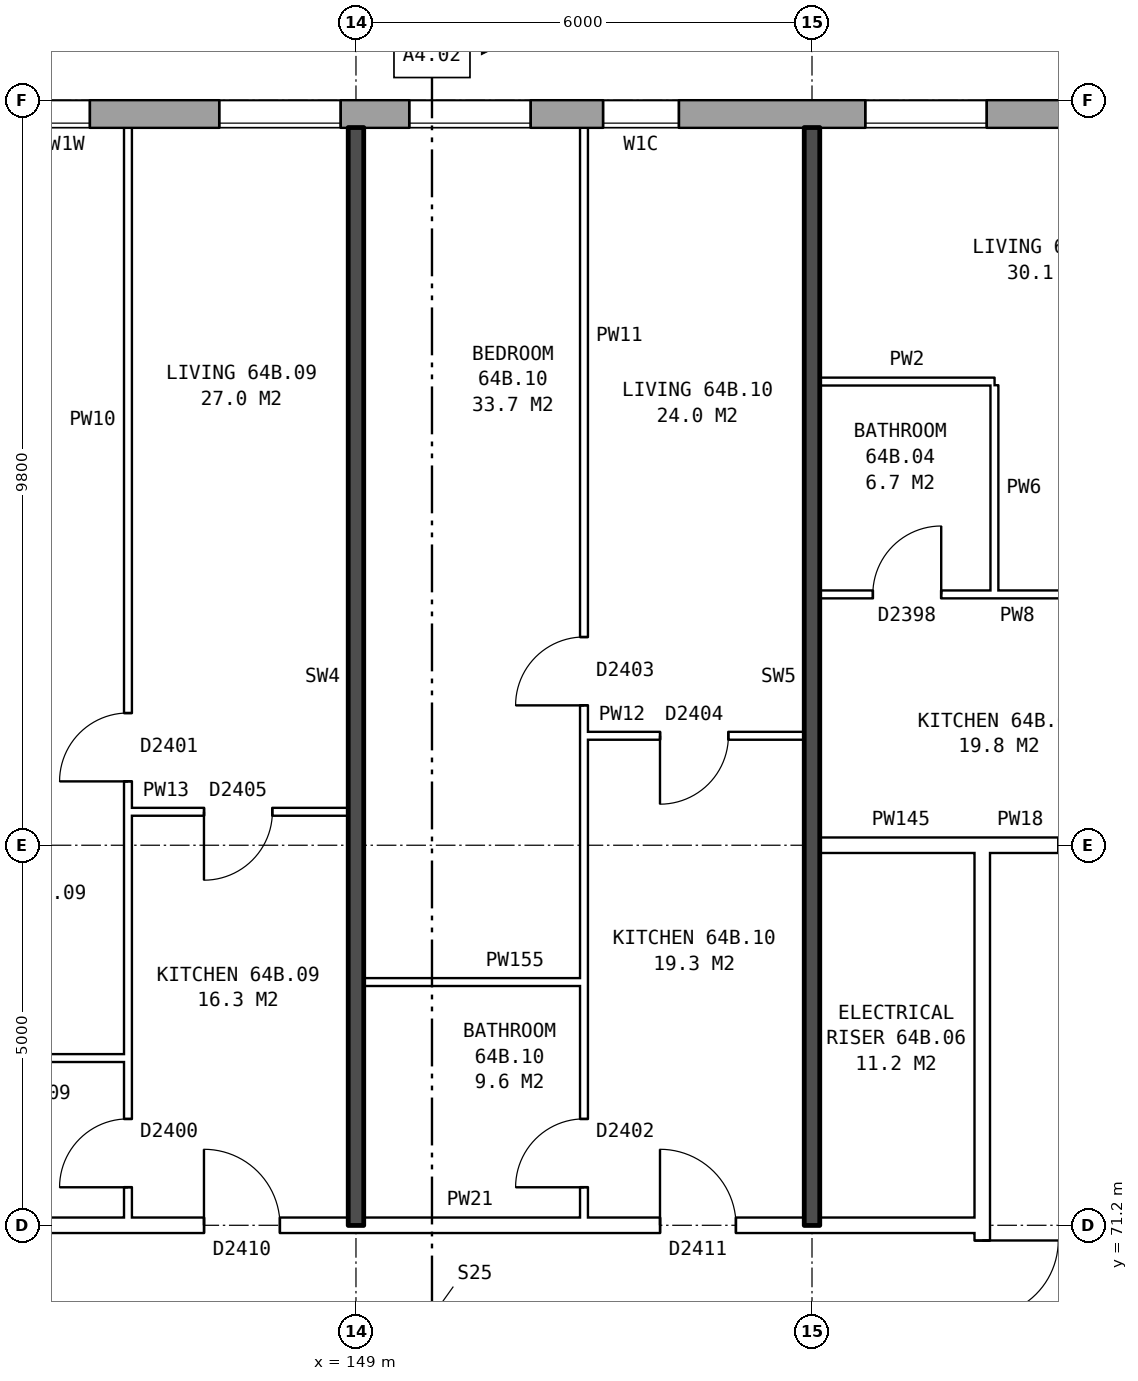
"""IFC4 building model, lengths in metres.
Left out: names, types, materials, properties, quantities, classifications, styles, units other than length and angle.
Written with IfcOpenShell. Run it as: python <this file> out.ifc"""

import sys

from ifc_helpers import new_model, si_unit, direction, frame, frame_2d, origin, place, context, subcontext, project, spatial, rectangle, extrude, element, fill, save


model = new_model("IFC4")
c1 = context("Model", 3, precision=1e-05, world=origin(), true_north=direction((0.0, 1.0)))
c2 = subcontext(c1, "Body", "Model", "MODEL_VIEW")
j1 = project(units=[si_unit("LENGTHUNIT", "METRE"), si_unit("PLANEANGLEUNIT", "RADIAN")], contexts=[c1])
p1 = place(None, origin())
s1 = spatial("IfcSite", under=j1, at=p1, CompositionType="ELEMENT")
p2 = place(p1, origin())
s2 = spatial("IfcBuilding", under=s1, at=p2, CompositionType="ELEMENT")
p3 = place(p2, frame((0.0, 0.0, 227.6)))
s3 = spatial("IfcBuildingStorey", under=s2, at=p3, CompositionType="ELEMENT", Elevation=227.6)
p4 = place(p3, frame((165.925, 85.82, 0.0), z_axis=(0.0, 0.0, 1.0), x_axis=(-1.0, 0.0, 0.0)))
e1 = element("IfcWall", 1, at=p4, inside=s3, PredefinedType="STANDARD", context=c2, shape_type="SweptSolid", body=[
    extrude(rectangle(XDim=33.875, YDim=0.36, at=frame_2d((16.938, 0.0))), origin(), (0.0, 0.0, 1.0), 2.85),
])
p5 = place(p4, frame((2.625, 0.0, 0.8)))
e2 = element("IfcOpeningElement", 2, at=p5, cuts=e1, PredefinedType="OPENING", context=c2, shape_type="SweptSolid", body=[
    extrude(rectangle(XDim=1.6, YDim=1.8, at=frame_2d((0.8, 0.9))), frame((0.0, 0.19, 0.0), z_axis=(0.0, -1.0, 0.0), x_axis=(1.0, 0.0, 0.0)), (0.0, 0.0, 1.0), 0.38),
])
p6 = place(p4, frame((5.625, 0.0, 0.8)))
e3 = element("IfcOpeningElement", 3, at=p6, cuts=e1, PredefinedType="OPENING", context=c2, shape_type="SweptSolid", body=[
    extrude(rectangle(XDim=1.6, YDim=1.8, at=frame_2d((0.8, 0.9))), frame((0.0, 0.19, 0.0), z_axis=(0.0, -1.0, 0.0), x_axis=(1.0, 0.0, 0.0)), (0.0, 0.0, 1.0), 0.38),
])
p7 = place(p4, frame((8.625, 0.0, 0.8)))
e4 = element("IfcOpeningElement", 4, at=p7, cuts=e1, PredefinedType="OPENING", context=c2, shape_type="SweptSolid", body=[
    extrude(rectangle(XDim=1.6, YDim=1.8, at=frame_2d((0.8, 0.9))), frame((0.0, 0.19, 0.0), z_axis=(0.0, -1.0, 0.0), x_axis=(1.0, 0.0, 0.0)), (0.0, 0.0, 1.0), 0.38),
])
p8 = place(p4, frame((12.675, 0.0, 0.15)))
e5 = element("IfcOpeningElement", 5, at=p8, cuts=e1, PredefinedType="OPENING", context=c2, shape_type="SweptSolid", body=[
    extrude(rectangle(XDim=1.0, YDim=1.8, at=frame_2d((0.5, 0.9))), frame((0.0, 0.19, 0.0), z_axis=(0.0, -1.0, 0.0), x_axis=(1.0, 0.0, 0.0)), (0.0, 0.0, 1.0), 0.38),
])
p9 = place(p4, frame((14.625, 0.0, 0.8)))
e6 = element("IfcOpeningElement", 6, at=p9, cuts=e1, PredefinedType="OPENING", context=c2, shape_type="SweptSolid", body=[
    extrude(rectangle(XDim=1.6, YDim=1.8, at=frame_2d((0.8, 0.9))), frame((0.0, 0.19, 0.0), z_axis=(0.0, -1.0, 0.0), x_axis=(1.0, 0.0, 0.0)), (0.0, 0.0, 1.0), 0.38),
])
p10 = place(p4, frame((17.125, 0.0, 0.8)))
e7 = element("IfcOpeningElement", 7, at=p10, cuts=e1, PredefinedType="OPENING", context=c2, shape_type="SweptSolid", body=[
    extrude(rectangle(XDim=1.6, YDim=1.8, at=frame_2d((0.8, 0.9))), frame((0.0, 0.19, 0.0), z_axis=(0.0, -1.0, 0.0), x_axis=(1.0, 0.0, 0.0)), (0.0, 0.0, 1.0), 0.38),
])
p11 = place(p4, frame((20.425, 0.0, 1.7)))
e8 = element("IfcOpeningElement", 8, at=p11, cuts=e1, PredefinedType="OPENING", context=c2, shape_type="SweptSolid", body=[
    extrude(rectangle(XDim=0.6, YDim=0.9, at=frame_2d((0.3, 0.45))), frame((0.0, 0.19, 0.0), z_axis=(0.0, -1.0, 0.0), x_axis=(1.0, 0.0, 0.0)), (0.0, 0.0, 1.0), 0.38),
])
p12 = place(p4, frame((23.625, 0.0, 0.8)))
e9 = element("IfcOpeningElement", 9, at=p12, cuts=e1, PredefinedType="OPENING", context=c2, shape_type="SweptSolid", body=[
    extrude(rectangle(XDim=1.6, YDim=1.8, at=frame_2d((0.8, 0.9))), frame((0.0, 0.19, 0.0), z_axis=(0.0, -1.0, 0.0), x_axis=(1.0, 0.0, 0.0)), (0.0, 0.0, 1.0), 0.38),
])
p13 = place(p4, frame((26.625, 0.0, 0.8)))
e10 = element("IfcOpeningElement", 10, at=p13, cuts=e1, PredefinedType="OPENING", context=c2, shape_type="SweptSolid", body=[
    extrude(rectangle(XDim=1.6, YDim=1.8, at=frame_2d((0.8, 0.9))), frame((0.0, 0.19, 0.0), z_axis=(0.0, -1.0, 0.0), x_axis=(1.0, 0.0, 0.0)), (0.0, 0.0, 1.0), 0.38),
])
p14 = place(p4, frame((29.625, 0.0, 0.8)))
e11 = element("IfcOpeningElement", 11, at=p14, cuts=e1, PredefinedType="OPENING", context=c2, shape_type="SweptSolid", body=[
    extrude(rectangle(XDim=1.6, YDim=1.8, at=frame_2d((0.8, 0.9))), frame((0.0, 0.19, 0.0), z_axis=(0.0, -1.0, 0.0), x_axis=(1.0, 0.0, 0.0)), (0.0, 0.0, 1.0), 0.38),
])
p15 = place(p4, frame((21.325, 0.0, 0.8)))
e12 = element("IfcOpeningElement", 12, at=p15, cuts=e1, PredefinedType="OPENING", context=c2, shape_type="SweptSolid", body=[
    extrude(rectangle(XDim=1.4, YDim=1.8, at=frame_2d((0.7, 0.9))), frame((0.0, 0.19, 0.0), z_axis=(0.0, -1.0, 0.0), x_axis=(1.0, 0.0, 0.0)), (0.0, 0.0, 1.0), 0.38),
])
p16 = place(p3, frame((157.24, 63.9, 0.0), z_axis=(0.0, 0.0, 1.0), x_axis=(0.0, 1.0, 0.0)))
e13 = element("IfcWall", 13, at=p16, inside=s3, PredefinedType="PARTITIONING", context=c2, shape_type="SweptSolid", body=[
    extrude(rectangle(XDim=12.2, YDim=0.2, at=frame_2d((6.1, 0.0))), origin(), (0.0, 0.0, 1.0), 2.85),
])
p17 = place(p16, frame((5.1, 0.0, 0.0)))
e14 = element("IfcOpeningElement", 14, at=p17, cuts=e13, PredefinedType="OPENING", context=c2, shape_type="SweptSolid", body=[
    extrude(rectangle(XDim=2.0, YDim=2.1, at=frame_2d((1.0, 1.05))), frame((0.0, 0.11, 0.0), z_axis=(0.0, -1.0, 0.0), x_axis=(1.0, 0.0, 0.0)), (0.0, 0.0, 1.0), 0.22),
])
p18 = place(p3, frame((142.76, 71.2, 0.0), z_axis=(0.0, 0.0, 1.0), x_axis=(1.0, 0.0, 0.0)))
e15 = element("IfcWall", 15, at=p18, inside=s3, PredefinedType="PARTITIONING", context=c2, shape_type="SweptSolid", body=[
    extrude(rectangle(XDim=14.48, YDim=0.2, at=frame_2d((7.24, 0.0))), origin(), (0.0, 0.0, 1.0), 2.85),
])
p19 = place(p18, frame((4.24, 0.0, 0.0)))
e16 = element("IfcOpeningElement", 16, at=p19, cuts=e15, PredefinedType="OPENING", context=c2, shape_type="SweptSolid", body=[
    extrude(rectangle(XDim=1.0, YDim=2.1, at=frame_2d((0.5, 1.05))), frame((0.0, 0.11, 0.0), z_axis=(0.0, -1.0, 0.0), x_axis=(1.0, 0.0, 0.0)), (0.0, 0.0, 1.0), 0.22),
])
p20 = place(p18, frame((10.24, 0.0, 0.0)))
e17 = element("IfcOpeningElement", 17, at=p20, cuts=e15, PredefinedType="OPENING", context=c2, shape_type="SweptSolid", body=[
    extrude(rectangle(XDim=1.0, YDim=2.1, at=frame_2d((0.5, 1.05))), frame((0.0, 0.11, 0.0), z_axis=(0.0, -1.0, 0.0), x_axis=(1.0, 0.0, 0.0)), (0.0, 0.0, 1.0), 0.22),
])
p21 = place(p3, frame((142.76, 73.4, 0.0), z_axis=(0.0, 0.0, 1.0), x_axis=(1.0, 0.0, 0.0)))
e18 = element("IfcWall", 18, at=p21, inside=s3, PredefinedType="PARTITIONING", context=c2, shape_type="SweptSolid", body=[
    extrude(rectangle(XDim=3.24, YDim=0.1, at=frame_2d((1.62, 0.0))), origin(), (0.0, 0.0, 1.0), 2.85),
])
p22 = place(p3, frame((149.1, 74.4, 0.0), z_axis=(0.0, 0.0, 1.0), x_axis=(1.0, 0.0, 0.0)))
e19 = element("IfcWall", 19, at=p22, inside=s3, PredefinedType="PARTITIONING", context=c2, shape_type="SweptSolid", body=[
    extrude(rectangle(XDim=2.9, YDim=0.1, at=frame_2d((1.45, 0.0))), origin(), (0.0, 0.0, 1.0), 2.85),
])
p23 = place(p3, frame((155.1, 76.2, 0.0), z_axis=(0.0, 0.0, 1.0), x_axis=(1.0, 0.0, 0.0)))
e20 = element("IfcWall", 20, at=p23, inside=s3, PredefinedType="PARTITIONING", context=c2, shape_type="SweptSolid", body=[
    extrude(rectangle(XDim=2.14, YDim=0.2, at=frame_2d((1.07, 0.0))), origin(), (0.0, 0.0, 1.0), 2.85),
])
p24 = place(p3, frame((157.24, 76.2, 0.0), z_axis=(0.0, 0.0, 1.0), x_axis=(1.0, 0.0, 0.0)))
e21 = element("IfcWall", 21, at=p24, inside=s3, PredefinedType="PARTITIONING", context=c2, shape_type="SweptSolid", body=[
    extrude(rectangle(XDim=3.0, YDim=0.2, at=frame_2d((1.5, 0.0))), origin(), (0.0, 0.0, 1.0), 2.85),
])
p25 = place(p24, frame((1.0, 0.0, 0.0)))
e22 = element("IfcOpeningElement", 22, at=p25, cuts=e21, PredefinedType="OPENING", context=c2, shape_type="SweptSolid", body=[
    extrude(rectangle(XDim=1.0, YDim=2.1, at=frame_2d((0.5, 1.05))), frame((0.0, 0.11, 0.0), z_axis=(0.0, -1.0, 0.0), x_axis=(1.0, 0.0, 0.0)), (0.0, 0.0, 1.0), 0.22),
])
p26 = place(p3, frame((146.0, 76.64, 0.0), z_axis=(0.0, 0.0, 1.0), x_axis=(1.0, 0.0, 0.0)))
e23 = element("IfcWall", 23, at=p26, inside=s3, PredefinedType="PARTITIONING", context=c2, shape_type="SweptSolid", body=[
    extrude(rectangle(XDim=2.9, YDim=0.1, at=frame_2d((1.45, 0.0))), origin(), (0.0, 0.0, 1.0), 2.85),
])
p27 = place(p26, frame((1.0, 0.0, 0.0)))
e24 = element("IfcOpeningElement", 24, at=p27, cuts=e23, PredefinedType="OPENING", context=c2, shape_type="SweptSolid", body=[
    extrude(rectangle(XDim=0.9, YDim=2.1, at=frame_2d((0.45, 1.05))), frame((0.0, 0.06, 0.0), z_axis=(0.0, -1.0, 0.0), x_axis=(1.0, 0.0, 0.0)), (0.0, 0.0, 1.0), 0.12),
])
p28 = place(p3, frame((152.0, 77.64, 0.0), z_axis=(0.0, 0.0, 1.0), x_axis=(1.0, 0.0, 0.0)))
e25 = element("IfcWall", 25, at=p28, inside=s3, PredefinedType="PARTITIONING", context=c2, shape_type="SweptSolid", body=[
    extrude(rectangle(XDim=2.9, YDim=0.1, at=frame_2d((1.45, 0.0))), origin(), (0.0, 0.0, 1.0), 2.85),
])
p29 = place(p28, frame((1.0, 0.0, 0.0)))
e26 = element("IfcOpeningElement", 26, at=p29, cuts=e25, PredefinedType="OPENING", context=c2, shape_type="SweptSolid", body=[
    extrude(rectangle(XDim=0.9, YDim=2.1, at=frame_2d((0.45, 1.05))), frame((0.0, 0.06, 0.0), z_axis=(0.0, -1.0, 0.0), x_axis=(1.0, 0.0, 0.0)), (0.0, 0.0, 1.0), 0.12),
])
p30 = place(p3, frame((155.1, 79.5, 0.0), z_axis=(0.0, 0.0, 1.0), x_axis=(1.0, 0.0, 0.0)))
e27 = element("IfcWall", 27, at=p30, inside=s3, PredefinedType="PARTITIONING", context=c2, shape_type="SweptSolid", body=[
    extrude(rectangle(XDim=5.8, YDim=0.1, at=frame_2d((2.9, 0.0))), origin(), (0.0, 0.0, 1.0), 2.85),
])
p31 = place(p30, frame((3.6, 0.0, 0.0)))
e28 = element("IfcOpeningElement", 28, at=p31, cuts=e27, PredefinedType="OPENING", context=c2, shape_type="SweptSolid", body=[
    extrude(rectangle(XDim=0.9, YDim=2.1, at=frame_2d((0.45, 1.05))), frame((0.0, 0.06, 0.0), z_axis=(0.0, -1.0, 0.0), x_axis=(1.0, 0.0, 0.0)), (0.0, 0.0, 1.0), 0.12),
])
p32 = place(p30, frame((0.7, 0.0, 0.0)))
e29 = element("IfcOpeningElement", 29, at=p32, cuts=e27, PredefinedType="OPENING", context=c2, shape_type="SweptSolid", body=[
    extrude(rectangle(XDim=0.9, YDim=2.1, at=frame_2d((0.45, 1.05))), frame((0.0, 0.06, 0.0), z_axis=(0.0, -1.0, 0.0), x_axis=(1.0, 0.0, 0.0)), (0.0, 0.0, 1.0), 0.12),
])
p33 = place(p3, frame((155.1, 82.3, 0.0), z_axis=(0.0, 0.0, 1.0), x_axis=(1.0, 0.0, 0.0)))
e30 = element("IfcWall", 30, at=p33, inside=s3, PredefinedType="PARTITIONING", context=c2, shape_type="SweptSolid", body=[
    extrude(rectangle(XDim=2.3, YDim=0.1, at=frame_2d((1.15, 0.0))), origin(), (0.0, 0.0, 1.0), 2.85),
])
p34 = place(p3, frame((146.0, 71.3, 0.0), z_axis=(0.0, 0.0, 1.0), x_axis=(0.0, 1.0, 0.0)))
e31 = element("IfcWall", 31, at=p34, inside=s3, PredefinedType="PARTITIONING", context=c2, shape_type="SweptSolid", body=[
    extrude(rectangle(XDim=14.34, YDim=0.1, at=frame_2d((7.17, 0.0))), origin(), (0.0, 0.0, 1.0), 2.85),
])
p35 = place(p34, frame((5.74, 0.0, 0.0)))
e32 = element("IfcOpeningElement", 32, at=p35, cuts=e31, PredefinedType="OPENING", context=c2, shape_type="SweptSolid", body=[
    extrude(rectangle(XDim=0.9, YDim=2.1, at=frame_2d((0.45, 1.05))), frame((0.0, 0.06, 0.0), z_axis=(0.0, -1.0, 0.0), x_axis=(1.0, 0.0, 0.0)), (0.0, 0.0, 1.0), 0.12),
])
p36 = place(p34, frame((0.4, 0.0, 0.0)))
e33 = element("IfcOpeningElement", 33, at=p36, cuts=e31, PredefinedType="OPENING", context=c2, shape_type="SweptSolid", body=[
    extrude(rectangle(XDim=0.9, YDim=2.1, at=frame_2d((0.45, 1.05))), frame((0.0, 0.06, 0.0), z_axis=(0.0, -1.0, 0.0), x_axis=(1.0, 0.0, 0.0)), (0.0, 0.0, 1.0), 0.12),
])
p37 = place(p3, frame((149.0, 71.2, 0.0), z_axis=(0.0, 0.0, 1.0), x_axis=(0.0, 1.0, 0.0)))
e34 = element("IfcWall", 34, at=p37, inside=s3, PredefinedType="SOLIDWALL", context=c2, shape_type="SweptSolid", body=[
    extrude(rectangle(XDim=14.44, YDim=0.2, at=frame_2d((7.22, 0.0))), origin(), (0.0, 0.0, 1.0), 2.85),
])
p38 = place(p3, frame((152.0, 71.3, 0.0), z_axis=(0.0, 0.0, 1.0), x_axis=(0.0, 1.0, 0.0)))
e35 = element("IfcWall", 35, at=p38, inside=s3, PredefinedType="PARTITIONING", context=c2, shape_type="SweptSolid", body=[
    extrude(rectangle(XDim=14.34, YDim=0.1, at=frame_2d((7.17, 0.0))), origin(), (0.0, 0.0, 1.0), 2.85),
])
p39 = place(p38, frame((6.74, 0.0, 0.0)))
e36 = element("IfcOpeningElement", 36, at=p39, cuts=e35, PredefinedType="OPENING", context=c2, shape_type="SweptSolid", body=[
    extrude(rectangle(XDim=0.9, YDim=2.1, at=frame_2d((0.45, 1.05))), frame((0.0, 0.06, 0.0), z_axis=(0.0, -1.0, 0.0), x_axis=(1.0, 0.0, 0.0)), (0.0, 0.0, 1.0), 0.12),
])
p40 = place(p38, frame((0.4, 0.0, 0.0)))
e37 = element("IfcOpeningElement", 37, at=p40, cuts=e35, PredefinedType="OPENING", context=c2, shape_type="SweptSolid", body=[
    extrude(rectangle(XDim=0.9, YDim=2.1, at=frame_2d((0.45, 1.05))), frame((0.0, 0.06, 0.0), z_axis=(0.0, -1.0, 0.0), x_axis=(1.0, 0.0, 0.0)), (0.0, 0.0, 1.0), 0.12),
])
p41 = place(p3, frame((155.0, 71.2, 0.0), z_axis=(0.0, 0.0, 1.0), x_axis=(0.0, 1.0, 0.0)))
e38 = element("IfcWall", 38, at=p41, inside=s3, PredefinedType="SOLIDWALL", context=c2, shape_type="SweptSolid", body=[
    extrude(rectangle(XDim=14.44, YDim=0.2, at=frame_2d((7.22, 0.0))), origin(), (0.0, 0.0, 1.0), 2.85),
])
p42 = place(p3, frame((157.4, 79.55, 0.0), z_axis=(0.0, 0.0, 1.0), x_axis=(0.0, 1.0, 0.0)))
e39 = element("IfcWall", 39, at=p42, inside=s3, PredefinedType="PARTITIONING", context=c2, shape_type="SweptSolid", body=[
    extrude(rectangle(XDim=2.7, YDim=0.1, at=frame_2d((1.35, 0.0))), origin(), (0.0, 0.0, 1.0), 2.85),
])
p43 = place(p7, origin())
e40 = element("IfcWindow", 40, at=p43, inside=s3, PartitioningType="SINGLE_PANEL", PredefinedType="WINDOW", context=c2, shape_type="SweptSolid", body=[
    extrude(rectangle(XDim=1.6, YDim=1.8, at=frame_2d((0.8, 0.9))), frame((0.0, 0.15, 0.0), z_axis=(0.0, -1.0, 0.0), x_axis=(1.0, 0.0, 0.0)), (0.0, 0.0, 1.0), 0.06),
])
fill(e4, e40)
p44 = place(p8, origin())
e41 = element("IfcWindow", 41, at=p44, inside=s3, PartitioningType="SINGLE_PANEL", PredefinedType="WINDOW", context=c2, shape_type="SweptSolid", body=[
    extrude(rectangle(XDim=1.0, YDim=1.8, at=frame_2d((0.5, 0.9))), frame((0.0, 0.15, 0.0), z_axis=(0.0, -1.0, 0.0), x_axis=(1.0, 0.0, 0.0)), (0.0, 0.0, 1.0), 0.06),
])
fill(e5, e41)
p45 = place(p9, origin())
e42 = element("IfcWindow", 42, at=p45, inside=s3, PartitioningType="SINGLE_PANEL", PredefinedType="WINDOW", context=c2, shape_type="SweptSolid", body=[
    extrude(rectangle(XDim=1.6, YDim=1.8, at=frame_2d((0.8, 0.9))), frame((0.0, 0.15, 0.0), z_axis=(0.0, -1.0, 0.0), x_axis=(1.0, 0.0, 0.0)), (0.0, 0.0, 1.0), 0.06),
])
fill(e6, e42)
p46 = place(p10, origin())
e43 = element("IfcWindow", 43, at=p46, inside=s3, PartitioningType="SINGLE_PANEL", PredefinedType="WINDOW", context=c2, shape_type="SweptSolid", body=[
    extrude(rectangle(XDim=1.6, YDim=1.8, at=frame_2d((0.8, 0.9))), frame((0.0, 0.15, 0.0), z_axis=(0.0, -1.0, 0.0), x_axis=(1.0, 0.0, 0.0)), (0.0, 0.0, 1.0), 0.06),
])
fill(e7, e43)
p47 = place(p11, origin())
e44 = element("IfcWindow", 44, at=p47, inside=s3, PartitioningType="SINGLE_PANEL", PredefinedType="WINDOW", context=c2, shape_type="SweptSolid", body=[
    extrude(rectangle(XDim=0.6, YDim=0.9, at=frame_2d((0.3, 0.45))), frame((0.0, 0.15, 0.0), z_axis=(0.0, -1.0, 0.0), x_axis=(1.0, 0.0, 0.0)), (0.0, 0.0, 1.0), 0.06),
])
fill(e8, e44)
p48 = place(p17, frame((2.0, 0.0, 0.0), z_axis=(0.0, 0.0, 1.0), x_axis=(-1.0, 0.0, 0.0)))
e45 = element("IfcDoor", 45, at=p48, inside=s3, OperationType="DOUBLE_DOOR_SINGLE_SWING", PredefinedType="DOOR", context=c2, shape_type="SweptSolid", body=[
    extrude(rectangle(XDim=2.0, YDim=2.1, at=frame_2d((1.0, 1.05))), frame((0.0, 0.025, 0.0), z_axis=(0.0, -1.0, 0.0), x_axis=(1.0, 0.0, 0.0)), (0.0, 0.0, 1.0), 0.05),
])
fill(e14, e45)
p49 = place(p32, origin())
e46 = element("IfcDoor", 46, at=p49, inside=s3, OperationType="SINGLE_SWING_RIGHT", PredefinedType="DOOR", context=c2, shape_type="SweptSolid", body=[
    extrude(rectangle(XDim=0.9, YDim=2.1, at=frame_2d((0.45, 1.05))), frame((0.0, 0.025, 0.0), z_axis=(0.0, -1.0, 0.0), x_axis=(1.0, 0.0, 0.0)), (0.0, 0.0, 1.0), 0.05),
])
fill(e29, e46)
p50 = place(p35, origin())
e47 = element("IfcDoor", 47, at=p50, inside=s3, OperationType="SINGLE_SWING_LEFT", PredefinedType="DOOR", context=c2, shape_type="SweptSolid", body=[
    extrude(rectangle(XDim=0.9, YDim=2.1, at=frame_2d((0.45, 1.05))), frame((0.0, 0.025, 0.0), z_axis=(0.0, -1.0, 0.0), x_axis=(1.0, 0.0, 0.0)), (0.0, 0.0, 1.0), 0.05),
])
fill(e32, e47)
p51 = place(p19, origin())
e48 = element("IfcDoor", 48, at=p51, inside=s3, OperationType="SINGLE_SWING_LEFT", PredefinedType="DOOR", context=c2, shape_type="SweptSolid", body=[
    extrude(rectangle(XDim=1.0, YDim=2.1, at=frame_2d((0.5, 1.05))), frame((0.0, 0.025, 0.0), z_axis=(0.0, -1.0, 0.0), x_axis=(1.0, 0.0, 0.0)), (0.0, 0.0, 1.0), 0.05),
])
fill(e16, e48)
p52 = place(p27, frame((0.9, 0.0, 0.0), z_axis=(0.0, 0.0, 1.0), x_axis=(-1.0, 0.0, 0.0)))
e49 = element("IfcDoor", 49, at=p52, inside=s3, OperationType="SINGLE_SWING_RIGHT", PredefinedType="DOOR", context=c2, shape_type="SweptSolid", body=[
    extrude(rectangle(XDim=0.9, YDim=2.1, at=frame_2d((0.45, 1.05))), frame((0.0, 0.025, 0.0), z_axis=(0.0, -1.0, 0.0), x_axis=(1.0, 0.0, 0.0)), (0.0, 0.0, 1.0), 0.05),
])
fill(e24, e49)
p53 = place(p36, origin())
e50 = element("IfcDoor", 50, at=p53, inside=s3, OperationType="SINGLE_SWING_LEFT", PredefinedType="DOOR", context=c2, shape_type="SweptSolid", body=[
    extrude(rectangle(XDim=0.9, YDim=2.1, at=frame_2d((0.45, 1.05))), frame((0.0, 0.025, 0.0), z_axis=(0.0, -1.0, 0.0), x_axis=(1.0, 0.0, 0.0)), (0.0, 0.0, 1.0), 0.05),
])
fill(e33, e50)
p54 = place(p39, origin())
e51 = element("IfcDoor", 51, at=p54, inside=s3, OperationType="SINGLE_SWING_LEFT", PredefinedType="DOOR", context=c2, shape_type="SweptSolid", body=[
    extrude(rectangle(XDim=0.9, YDim=2.1, at=frame_2d((0.45, 1.05))), frame((0.0, 0.025, 0.0), z_axis=(0.0, -1.0, 0.0), x_axis=(1.0, 0.0, 0.0)), (0.0, 0.0, 1.0), 0.05),
])
fill(e36, e51)
p55 = place(p20, origin())
e52 = element("IfcDoor", 52, at=p55, inside=s3, OperationType="SINGLE_SWING_LEFT", PredefinedType="DOOR", context=c2, shape_type="SweptSolid", body=[
    extrude(rectangle(XDim=1.0, YDim=2.1, at=frame_2d((0.5, 1.05))), frame((0.0, 0.025, 0.0), z_axis=(0.0, -1.0, 0.0), x_axis=(1.0, 0.0, 0.0)), (0.0, 0.0, 1.0), 0.05),
])
fill(e17, e52)
p56 = place(p29, frame((0.9, 0.0, 0.0), z_axis=(0.0, 0.0, 1.0), x_axis=(-1.0, 0.0, 0.0)))
e53 = element("IfcDoor", 53, at=p56, inside=s3, OperationType="SINGLE_SWING_RIGHT", PredefinedType="DOOR", context=c2, shape_type="SweptSolid", body=[
    extrude(rectangle(XDim=0.9, YDim=2.1, at=frame_2d((0.45, 1.05))), frame((0.0, 0.025, 0.0), z_axis=(0.0, -1.0, 0.0), x_axis=(1.0, 0.0, 0.0)), (0.0, 0.0, 1.0), 0.05),
])
fill(e26, e53)
p57 = place(p40, origin())
e54 = element("IfcDoor", 54, at=p57, inside=s3, OperationType="SINGLE_SWING_LEFT", PredefinedType="DOOR", context=c2, shape_type="SweptSolid", body=[
    extrude(rectangle(XDim=0.9, YDim=2.1, at=frame_2d((0.45, 1.05))), frame((0.0, 0.025, 0.0), z_axis=(0.0, -1.0, 0.0), x_axis=(1.0, 0.0, 0.0)), (0.0, 0.0, 1.0), 0.05),
])
fill(e37, e54)
save(model, sys.argv[1])
